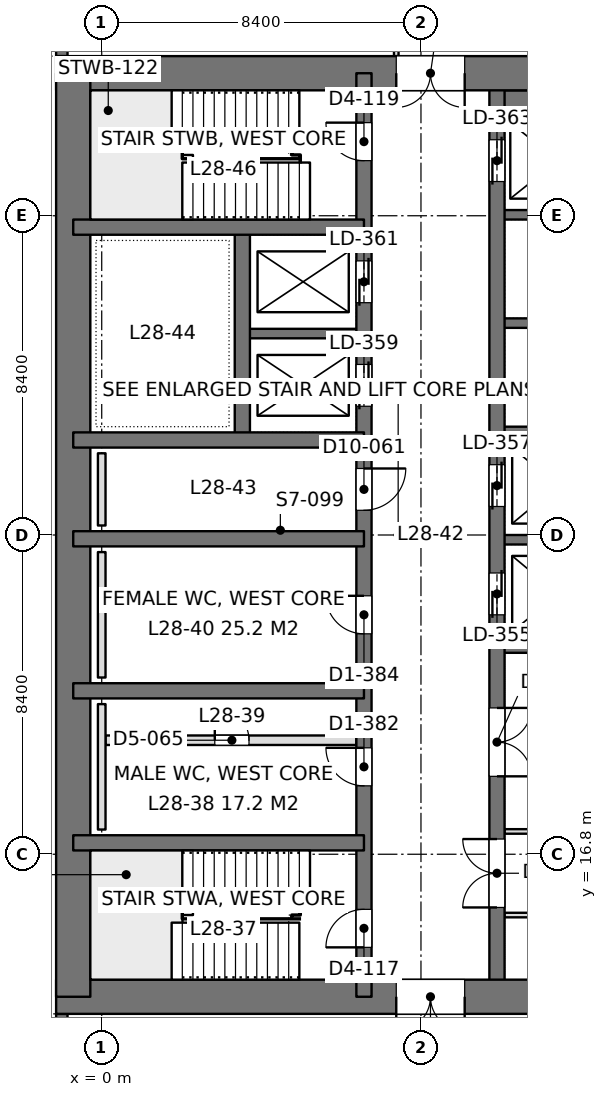
"""IFC4 building model, lengths in metres.
Left out: names, types, materials, properties, quantities, classifications, styles, units other than length and angle.
Written with IfcOpenShell. Run it as: python <this file> out.ifc"""

import sys

from ifc_helpers import new_model, si_unit, direction, frame, frame_2d, origin, place, context, subcontext, project, spatial, rectangle, extrude, element, fill, save


model = new_model("IFC4")
c1 = context("Model", 3, precision=1e-05, world=origin(), true_north=direction((0.0, 1.0)))
c2 = subcontext(c1, "Body", "Model", "MODEL_VIEW")
j1 = project(units=[si_unit("LENGTHUNIT", "METRE"), si_unit("PLANEANGLEUNIT", "RADIAN")], contexts=[c1])
p1 = place(None, origin())
s1 = spatial("IfcSite", under=j1, at=p1, CompositionType="ELEMENT")
p2 = place(p1, origin())
s2 = spatial("IfcBuilding", under=s1, at=p2, CompositionType="ELEMENT")
p3 = place(p2, frame((0.0, 0.0, 126.0)))
s3 = spatial("IfcBuildingStorey", under=s2, at=p3, CompositionType="ELEMENT", Elevation=126.0)
p4 = place(p3, frame((-1.2, 13.05, 0.0), z_axis=(0.0, 0.0, 1.0), x_axis=(1.0, 0.0, 0.0)))
e1 = element("IfcWall", 1, at=p4, inside=s3, PredefinedType="SHEAR", context=c2, shape_type="SweptSolid", body=[
    extrude(rectangle(XDim=18.0, YDim=0.9, at=frame_2d((9.0, 0.0))), origin(), (0.0, 0.0, 1.0), 4.2),
])
p5 = place(p4, frame((8.95, 0.0, 0.0)))
e2 = element("IfcOpeningElement", 2, at=p5, cuts=e1, PredefinedType="OPENING", context=c2, shape_type="SweptSolid", body=[
    extrude(rectangle(XDim=1.8, YDim=2.4, at=frame_2d((0.9, 1.2))), frame((0.0, 0.46, 0.0), z_axis=(0.0, -1.0, 0.0), x_axis=(1.0, 0.0, 0.0)), (0.0, 0.0, 1.0), 0.92),
])
p6 = place(p3, frame((-1.2, 37.35, 0.0), z_axis=(0.0, 0.0, 1.0), x_axis=(1.0, 0.0, 0.0)))
e3 = element("IfcWall", 3, at=p6, inside=s3, PredefinedType="SHEAR", context=c2, shape_type="SweptSolid", body=[
    extrude(rectangle(XDim=18.0, YDim=0.9, at=frame_2d((9.0, 0.0))), origin(), (0.0, 0.0, 1.0), 4.2),
])
p7 = place(p6, frame((8.95, 0.0, 0.0)))
e4 = element("IfcOpeningElement", 4, at=p7, cuts=e3, PredefinedType="OPENING", context=c2, shape_type="SweptSolid", body=[
    extrude(rectangle(XDim=1.8, YDim=2.4, at=frame_2d((0.9, 1.2))), frame((0.0, 0.46, 0.0), z_axis=(0.0, -1.0, 0.0), x_axis=(1.0, 0.0, 0.0)), (0.0, 0.0, 1.0), 0.92),
])
p8 = place(p3, frame((-0.75, 13.05, 0.0), z_axis=(0.0, 0.0, 1.0), x_axis=(0.0, 1.0, 0.0)))
e5 = element("IfcWall", 5, at=p8, inside=s3, PredefinedType="SHEAR", context=c2, shape_type="SweptSolid", body=[
    extrude(rectangle(XDim=24.3, YDim=0.9, at=frame_2d((12.15, 0.0))), origin(), (0.0, 0.0, 1.0), 4.2),
])
p9 = place(p3, frame((6.9, 13.05, 0.0), z_axis=(0.0, 0.0, 1.0), x_axis=(0.0, 1.0, 0.0)))
e6 = element("IfcWall", 6, at=p9, inside=s3, PredefinedType="SHEAR", context=c2, shape_type="SweptSolid", body=[
    extrude(rectangle(XDim=24.3, YDim=0.4, at=frame_2d((12.15, 0.0))), origin(), (0.0, 0.0, 1.0), 4.2),
])
p10 = place(p9, frame((1.3, 0.0, 0.0)))
e7 = element("IfcOpeningElement", 7, at=p10, cuts=e6, PredefinedType="OPENING", context=c2, shape_type="SweptSolid", body=[
    extrude(rectangle(XDim=1.0, YDim=2.2, at=frame_2d((0.5, 1.1))), frame((0.0, 0.21, 0.0), z_axis=(0.0, -1.0, 0.0), x_axis=(1.0, 0.0, 0.0)), (0.0, 0.0, 1.0), 0.42),
])
p11 = place(p9, frame((22.0, 0.0, 0.0)))
e8 = element("IfcOpeningElement", 8, at=p11, cuts=e6, PredefinedType="OPENING", context=c2, shape_type="SweptSolid", body=[
    extrude(rectangle(XDim=1.0, YDim=2.2, at=frame_2d((0.5, 1.1))), frame((0.0, 0.21, 0.0), z_axis=(0.0, -1.0, 0.0), x_axis=(1.0, 0.0, 0.0)), (0.0, 0.0, 1.0), 0.42),
])
p12 = place(p9, frame((5.55, 0.0, 0.0)))
e9 = element("IfcOpeningElement", 9, at=p12, cuts=e6, PredefinedType="OPENING", context=c2, shape_type="SweptSolid", body=[
    extrude(rectangle(XDim=1.0, YDim=2.2, at=frame_2d((0.5, 1.1))), frame((0.0, 0.21, 0.0), z_axis=(0.0, -1.0, 0.0), x_axis=(1.0, 0.0, 0.0)), (0.0, 0.0, 1.0), 0.42),
])
p13 = place(p9, frame((9.55, 0.0, 0.0)))
e10 = element("IfcOpeningElement", 10, at=p13, cuts=e6, PredefinedType="OPENING", context=c2, shape_type="SweptSolid", body=[
    extrude(rectangle(XDim=1.0, YDim=2.2, at=frame_2d((0.5, 1.1))), frame((0.0, 0.21, 0.0), z_axis=(0.0, -1.0, 0.0), x_axis=(1.0, 0.0, 0.0)), (0.0, 0.0, 1.0), 0.42),
])
p14 = place(p9, frame((12.8, 0.0, 0.0)))
e11 = element("IfcOpeningElement", 11, at=p14, cuts=e6, PredefinedType="OPENING", context=c2, shape_type="SweptSolid", body=[
    extrude(rectangle(XDim=1.1, YDim=2.2, at=frame_2d((0.55, 1.1))), frame((0.0, 0.21, 0.0), z_axis=(0.0, -1.0, 0.0), x_axis=(1.0, 0.0, 0.0)), (0.0, 0.0, 1.0), 0.42),
])
p15 = place(p9, frame((15.538, 0.0, 0.0)))
e12 = element("IfcOpeningElement", 12, at=p15, cuts=e6, PredefinedType="OPENING", context=c2, shape_type="SweptSolid", body=[
    extrude(rectangle(XDim=1.1, YDim=2.2, at=frame_2d((0.55, 1.1))), frame((0.0, 0.21, 0.0), z_axis=(0.0, -1.0, 0.0), x_axis=(1.0, 0.0, 0.0)), (0.0, 0.0, 1.0), 0.42),
])
p16 = place(p9, frame((18.262, 0.0, 0.0)))
e13 = element("IfcOpeningElement", 13, at=p16, cuts=e6, PredefinedType="OPENING", context=c2, shape_type="SweptSolid", body=[
    extrude(rectangle(XDim=1.1, YDim=2.2, at=frame_2d((0.55, 1.1))), frame((0.0, 0.21, 0.0), z_axis=(0.0, -1.0, 0.0), x_axis=(1.0, 0.0, 0.0)), (0.0, 0.0, 1.0), 0.42),
])
p17 = place(p3, frame((10.4, 13.05, 0.0), z_axis=(0.0, 0.0, 1.0), x_axis=(0.0, 1.0, 0.0)))
e14 = element("IfcWall", 14, at=p17, inside=s3, PredefinedType="SHEAR", context=c2, shape_type="SweptSolid", body=[
    extrude(rectangle(XDim=24.3, YDim=0.4, at=frame_2d((12.15, 0.0))), origin(), (0.0, 0.0, 1.0), 4.2),
])
p18 = place(p17, frame((10.05, 0.0, 0.0)))
e15 = element("IfcOpeningElement", 15, at=p18, cuts=e14, PredefinedType="OPENING", context=c2, shape_type="SweptSolid", body=[
    extrude(rectangle(XDim=1.1, YDim=2.2, at=frame_2d((0.55, 1.1))), frame((0.0, 0.21, 0.0), z_axis=(0.0, -1.0, 0.0), x_axis=(1.0, 0.0, 0.0)), (0.0, 0.0, 1.0), 0.42),
])
p19 = place(p17, frame((12.9, 0.0, 0.0)))
e16 = element("IfcOpeningElement", 16, at=p19, cuts=e14, PredefinedType="OPENING", context=c2, shape_type="SweptSolid", body=[
    extrude(rectangle(XDim=1.1, YDim=2.2, at=frame_2d((0.55, 1.1))), frame((0.0, 0.21, 0.0), z_axis=(0.0, -1.0, 0.0), x_axis=(1.0, 0.0, 0.0)), (0.0, 0.0, 1.0), 0.42),
])
p20 = place(p17, frame((21.45, 0.0, 0.0)))
e17 = element("IfcOpeningElement", 17, at=p20, cuts=e14, PredefinedType="OPENING", context=c2, shape_type="SweptSolid", body=[
    extrude(rectangle(XDim=1.1, YDim=2.2, at=frame_2d((0.55, 1.1))), frame((0.0, 0.21, 0.0), z_axis=(0.0, -1.0, 0.0), x_axis=(1.0, 0.0, 0.0)), (0.0, 0.0, 1.0), 0.42),
])
p21 = place(p17, frame((2.35, 0.0, 0.0)))
e18 = element("IfcOpeningElement", 18, at=p21, cuts=e14, PredefinedType="OPENING", context=c2, shape_type="SweptSolid", body=[
    extrude(rectangle(XDim=1.8, YDim=2.4, at=frame_2d((0.9, 1.2))), frame((0.0, 0.21, 0.0), z_axis=(0.0, -1.0, 0.0), x_axis=(1.0, 0.0, 0.0)), (0.0, 0.0, 1.0), 0.42),
])
p22 = place(p17, frame((5.8, 0.0, 0.0)))
e19 = element("IfcOpeningElement", 19, at=p22, cuts=e14, PredefinedType="OPENING", context=c2, shape_type="SweptSolid", body=[
    extrude(rectangle(XDim=1.8, YDim=2.4, at=frame_2d((0.9, 1.2))), frame((0.0, 0.21, 0.0), z_axis=(0.0, -1.0, 0.0), x_axis=(1.0, 0.0, 0.0)), (0.0, 0.0, 1.0), 0.42),
])
for number, where, z_axis, x_axis in (
    (20, (-0.75, 17.1, 0.0), (0.0, 0.0, 1.0), (1.0, 0.0, 0.0)),
    (21, (-0.75, 21.1, 0.0), (0.0, 0.0, 1.0), (1.0, 0.0, 0.0)),
    (22, (-0.75, 25.1, 0.0), (0.0, 0.0, 1.0), (1.0, 0.0, 0.0)),
    (23, (-0.75, 27.7, 0.0), (0.0, 0.0, 1.0), (1.0, 0.0, 0.0)),
    (24, (-0.75, 33.3, 0.0), (0.0, 0.0, 1.0), (1.0, 0.0, 0.0)),
):
    element("IfcWall", number, at=place(p3, frame(where, z_axis=z_axis, x_axis=x_axis)), inside=s3, PredefinedType="SHEAR", context=c2, shape_type="SweptSolid", body=[
        extrude(rectangle(XDim=7.65, YDim=0.4, at=frame_2d((3.825, 0.0))), origin(), (0.0, 0.0, 1.0), 4.2),
    ])
p23 = place(p3, frame((3.7, 27.7, 0.0), z_axis=(0.0, 0.0, 1.0), x_axis=(0.0, 1.0, 0.0)))
e25 = element("IfcWall", 25, at=p23, inside=s3, PredefinedType="SHEAR", context=c2, shape_type="SweptSolid", body=[
    extrude(rectangle(XDim=5.6, YDim=0.4, at=frame_2d((2.8, 0.0))), origin(), (0.0, 0.0, 1.0), 4.2),
])
p24 = place(p3, frame((3.7, 30.5, 0.0), z_axis=(0.0, 0.0, 1.0), x_axis=(1.0, 0.0, 0.0)))
e26 = element("IfcWall", 26, at=p24, inside=s3, PredefinedType="SHEAR", context=c2, shape_type="SweptSolid", body=[
    extrude(rectangle(XDim=3.2, YDim=0.25, at=frame_2d((1.6, 0.0))), origin(), (0.0, 0.0, 1.0), 4.2),
])
p25 = place(p3, frame((10.4, 22.225, 0.0), z_axis=(0.0, 0.0, 1.0), x_axis=(1.0, 0.0, 0.0)))
e27 = element("IfcWall", 27, at=p25, inside=s3, PredefinedType="SHEAR", context=c2, shape_type="SweptSolid", body=[
    extrude(rectangle(XDim=5.95, YDim=0.25, at=frame_2d((2.975, 0.0))), origin(), (0.0, 0.0, 1.0), 4.2),
])
for number, where, z_axis, x_axis in (
    (28, (10.4, 25.075, 0.0), (0.0, 0.0, 1.0), (1.0, 0.0, 0.0)),
    (29, (10.4, 27.925, 0.0), (0.0, 0.0, 1.0), (1.0, 0.0, 0.0)),
    (30, (10.4, 30.775, 0.0), (0.0, 0.0, 1.0), (1.0, 0.0, 0.0)),
    (31, (10.4, 33.625, 0.0), (0.0, 0.0, 1.0), (1.0, 0.0, 0.0)),
):
    element("IfcWall", number, at=place(p3, frame(where, z_axis=z_axis, x_axis=x_axis)), inside=s3, PredefinedType="SHEAR", context=c2, shape_type="SweptSolid", body=[
        extrude(rectangle(XDim=3.2, YDim=0.25, at=frame_2d((1.6, 0.0))), origin(), (0.0, 0.0, 1.0), 4.2),
    ])
p26 = place(p3, frame((10.4, 36.625, 0.0), z_axis=(0.0, 0.0, 1.0), x_axis=(1.0, 0.0, 0.0)))
e32 = element("IfcWall", 32, at=p26, inside=s3, PredefinedType="SHEAR", context=c2, shape_type="SweptSolid", body=[
    extrude(rectangle(XDim=3.2, YDim=0.55, at=frame_2d((1.6, 0.0))), origin(), (0.0, 0.0, 1.0), 4.2),
])
p27 = place(p3, frame((-1.05, 8.4, 0.0), z_axis=(0.0, 0.0, 1.0), x_axis=(0.0, 1.0, 0.0)))
e33 = element("IfcWall", 33, at=p27, inside=s3, PredefinedType="SOLIDWALL", context=c2, shape_type="SweptSolid", body=[
    extrude(rectangle(XDim=4.2, YDim=0.3, at=frame_2d((2.1, 0.0))), origin(), (0.0, 0.0, 1.0), 4.05),
])
p28 = place(p27, frame((0.9, 0.0, 0.9)))
e34 = element("IfcOpeningElement", 34, at=p28, cuts=e33, PredefinedType="OPENING", context=c2, shape_type="SweptSolid", body=[
    extrude(rectangle(XDim=2.4, YDim=1.9, at=frame_2d((1.2, 0.95))), frame((0.0, 0.16, 0.0), z_axis=(0.0, -1.0, 0.0), x_axis=(1.0, 0.0, 0.0)), (0.0, 0.0, 1.0), 0.32),
])
p29 = place(p3, frame((-1.05, 37.8, 0.0), z_axis=(0.0, 0.0, 1.0), x_axis=(0.0, 1.0, 0.0)))
e35 = element("IfcWall", 35, at=p29, inside=s3, PredefinedType="SOLIDWALL", context=c2, shape_type="SweptSolid", body=[
    extrude(rectangle(XDim=4.2, YDim=0.3, at=frame_2d((2.1, 0.0))), origin(), (0.0, 0.0, 1.0), 4.05),
])
p30 = place(p29, frame((0.9, 0.0, 0.9)))
e36 = element("IfcOpeningElement", 36, at=p30, cuts=e35, PredefinedType="OPENING", context=c2, shape_type="SweptSolid", body=[
    extrude(rectangle(XDim=2.4, YDim=1.9, at=frame_2d((1.2, 0.95))), frame((0.0, 0.16, 0.0), z_axis=(0.0, -1.0, 0.0), x_axis=(1.0, 0.0, 0.0)), (0.0, 0.0, 1.0), 0.32),
])
p31 = place(p3, frame((10.598, 17.4, 0.0), z_axis=(0.0, 0.0, 1.0), x_axis=(1.0, 0.0, 0.0)))
e37 = element("IfcWall", 37, at=p31, inside=s3, PredefinedType="PARTITIONING", context=c2, shape_type="SweptSolid", body=[
    extrude(rectangle(XDim=5.904, YDim=0.12, at=frame_2d((2.952, 0.0))), origin(), (0.0, 0.0, 1.0), 3.55),
])
p32 = place(p3, frame((10.598, 15.2, 0.0), z_axis=(0.0, 0.0, 1.0), x_axis=(1.0, 0.0, 0.0)))
e38 = element("IfcWall", 38, at=p32, inside=s3, PredefinedType="PARTITIONING", context=c2, shape_type="SweptSolid", body=[
    extrude(rectangle(XDim=6.204, YDim=0.12, at=frame_2d((3.102, 0.0))), origin(), (0.0, 0.0, 1.0), 3.55),
])
p33 = place(p3, frame((7.75, 37.8, 0.0), z_axis=(0.0, 0.0, 1.0), x_axis=(0.0, 1.0, 0.0)))
e39 = element("IfcWall", 39, at=p33, inside=s3, PredefinedType="PARTITIONING", context=c2, shape_type="SweptSolid", body=[
    extrude(rectangle(XDim=2.0, YDim=0.12, at=frame_2d((1.0, 0.0))), origin(), (0.0, 0.0, 1.0), 4.05),
])
p34 = place(p3, frame((0.1, 19.8, 0.0), z_axis=(0.0, 0.0, 1.0), x_axis=(1.0, 0.0, 0.0)))
e40 = element("IfcWall", 40, at=p34, inside=s3, PredefinedType="PARTITIONING", context=c2, shape_type="SweptSolid", body=[
    extrude(rectangle(XDim=6.6, YDim=0.25, at=frame_2d((3.3, 0.0))), origin(), (0.0, 0.0, 1.0), 4.0),
])
p35 = place(p34, frame((2.875, 0.0, 0.0)))
e41 = element("IfcOpeningElement", 41, at=p35, cuts=e40, PredefinedType="OPENING", context=c2, shape_type="SweptSolid", body=[
    extrude(rectangle(XDim=0.9, YDim=2.2, at=frame_2d((0.45, 1.1))), frame((0.0, 0.135, 0.0), z_axis=(0.0, -1.0, 0.0), x_axis=(1.0, 0.0, 0.0)), (0.0, 0.0, 1.0), 0.27),
])
for number, where, z_axis, x_axis in (
    (42, (0.0, 17.45, 0.0), (0.0, 0.0, 1.0), (0.0, 1.0, 0.0)),
    (43, (0.0, 21.45, 0.0), (0.0, 0.0, 1.0), (0.0, 1.0, 0.0)),
):
    element("IfcWall", number, at=place(p3, frame(where, z_axis=z_axis, x_axis=x_axis)), inside=s3, PredefinedType="PLUMBINGWALL", context=c2, shape_type="SweptSolid", body=[
        extrude(rectangle(XDim=3.3, YDim=0.2, at=frame_2d((1.65, 0.0))), origin(), (0.0, 0.0, 1.0), 1.2),
    ])
p36 = place(p3, frame((0.0, 25.45, 0.0), z_axis=(0.0, 0.0, 1.0), x_axis=(0.0, 1.0, 0.0)))
e44 = element("IfcWall", 44, at=p36, inside=s3, PredefinedType="PLUMBINGWALL", context=c2, shape_type="SweptSolid", body=[
    extrude(rectangle(XDim=1.9, YDim=0.2, at=frame_2d((0.95, 0.0))), origin(), (0.0, 0.0, 1.0), 1.2),
])
p37 = place(p5, frame((1.8, 0.0, 0.0), z_axis=(0.0, 0.0, 1.0), x_axis=(-1.0, 0.0, 0.0)))
e45 = element("IfcDoor", 45, at=p37, inside=s3, OperationType="DOUBLE_DOOR_SINGLE_SWING", PredefinedType="DOOR", context=c2, shape_type="SweptSolid", body=[
    extrude(rectangle(XDim=1.8, YDim=2.4, at=frame_2d((0.9, 1.2))), frame((0.0, 0.025, 0.0), z_axis=(0.0, -1.0, 0.0), x_axis=(1.0, 0.0, 0.0)), (0.0, 0.0, 1.0), 0.05),
])
fill(e2, e45)
p38 = place(p7, frame((1.8, 0.0, 0.0), z_axis=(0.0, 0.0, 1.0), x_axis=(-1.0, 0.0, 0.0)))
e46 = element("IfcDoor", 46, at=p38, inside=s3, OperationType="DOUBLE_DOOR_SINGLE_SWING", PredefinedType="DOOR", context=c2, shape_type="SweptSolid", body=[
    extrude(rectangle(XDim=1.8, YDim=2.4, at=frame_2d((0.9, 1.2))), frame((0.0, 0.025, 0.0), z_axis=(0.0, -1.0, 0.0), x_axis=(1.0, 0.0, 0.0)), (0.0, 0.0, 1.0), 0.05),
])
fill(e4, e46)
p39 = place(p10, origin())
e47 = element("IfcDoor", 47, at=p39, inside=s3, OperationType="SINGLE_SWING_LEFT", PredefinedType="DOOR", context=c2, shape_type="SweptSolid", body=[
    extrude(rectangle(XDim=1.0, YDim=2.2, at=frame_2d((0.5, 1.1))), frame((0.0, 0.025, 0.0), z_axis=(0.0, -1.0, 0.0), x_axis=(1.0, 0.0, 0.0)), (0.0, 0.0, 1.0), 0.05),
])
fill(e7, e47)
p40 = place(p11, origin())
e48 = element("IfcDoor", 48, at=p40, inside=s3, OperationType="SINGLE_SWING_RIGHT", PredefinedType="DOOR", context=c2, shape_type="SweptSolid", body=[
    extrude(rectangle(XDim=1.0, YDim=2.2, at=frame_2d((0.5, 1.1))), frame((0.0, 0.025, 0.0), z_axis=(0.0, -1.0, 0.0), x_axis=(1.0, 0.0, 0.0)), (0.0, 0.0, 1.0), 0.05),
])
fill(e8, e48)
p41 = place(p12, origin())
e49 = element("IfcDoor", 49, at=p41, inside=s3, OperationType="SINGLE_SWING_RIGHT", PredefinedType="DOOR", context=c2, shape_type="SweptSolid", body=[
    extrude(rectangle(XDim=1.0, YDim=2.2, at=frame_2d((0.5, 1.1))), frame((0.0, 0.025, 0.0), z_axis=(0.0, -1.0, 0.0), x_axis=(1.0, 0.0, 0.0)), (0.0, 0.0, 1.0), 0.05),
])
fill(e9, e49)
p42 = place(p13, origin())
e50 = element("IfcDoor", 50, at=p42, inside=s3, OperationType="SINGLE_SWING_RIGHT", PredefinedType="DOOR", context=c2, shape_type="SweptSolid", body=[
    extrude(rectangle(XDim=1.0, YDim=2.2, at=frame_2d((0.5, 1.1))), frame((0.0, 0.025, 0.0), z_axis=(0.0, -1.0, 0.0), x_axis=(1.0, 0.0, 0.0)), (0.0, 0.0, 1.0), 0.05),
])
fill(e10, e50)
p43 = place(p14, frame((1.1, 0.0, 0.0), z_axis=(0.0, 0.0, 1.0), x_axis=(-1.0, 0.0, 0.0)))
e51 = element("IfcDoor", 51, at=p43, inside=s3, OperationType="SINGLE_SWING_LEFT", PredefinedType="DOOR", context=c2, shape_type="SweptSolid", body=[
    extrude(rectangle(XDim=1.1, YDim=2.2, at=frame_2d((0.55, 1.1))), frame((0.0, 0.025, 0.0), z_axis=(0.0, -1.0, 0.0), x_axis=(1.0, 0.0, 0.0)), (0.0, 0.0, 1.0), 0.05),
])
fill(e11, e51)
p44 = place(p18, origin())
e52 = element("IfcDoor", 52, at=p44, inside=s3, OperationType="DOUBLE_DOOR_SLIDING", PredefinedType="DOOR", context=c2, shape_type="SweptSolid", body=[
    extrude(rectangle(XDim=1.1, YDim=2.2, at=frame_2d((0.55, 1.1))), frame((0.0, 0.025, 0.0), z_axis=(0.0, -1.0, 0.0), x_axis=(1.0, 0.0, 0.0)), (0.0, 0.0, 1.0), 0.05),
])
fill(e15, e52)
p45 = place(p19, origin())
e53 = element("IfcDoor", 53, at=p45, inside=s3, OperationType="DOUBLE_DOOR_SLIDING", PredefinedType="DOOR", context=c2, shape_type="SweptSolid", body=[
    extrude(rectangle(XDim=1.1, YDim=2.2, at=frame_2d((0.55, 1.1))), frame((0.0, 0.025, 0.0), z_axis=(0.0, -1.0, 0.0), x_axis=(1.0, 0.0, 0.0)), (0.0, 0.0, 1.0), 0.05),
])
fill(e16, e53)
p46 = place(p20, origin())
e54 = element("IfcDoor", 54, at=p46, inside=s3, OperationType="DOUBLE_DOOR_SLIDING", PredefinedType="DOOR", context=c2, shape_type="SweptSolid", body=[
    extrude(rectangle(XDim=1.1, YDim=2.2, at=frame_2d((0.55, 1.1))), frame((0.0, 0.025, 0.0), z_axis=(0.0, -1.0, 0.0), x_axis=(1.0, 0.0, 0.0)), (0.0, 0.0, 1.0), 0.05),
])
fill(e17, e54)
p47 = place(p15, origin())
e55 = element("IfcDoor", 55, at=p47, inside=s3, OperationType="DOUBLE_DOOR_SLIDING", PredefinedType="DOOR", context=c2, shape_type="SweptSolid", body=[
    extrude(rectangle(XDim=1.1, YDim=2.2, at=frame_2d((0.55, 1.1))), frame((0.0, 0.025, 0.0), z_axis=(0.0, -1.0, 0.0), x_axis=(1.0, 0.0, 0.0)), (0.0, 0.0, 1.0), 0.05),
])
fill(e12, e55)
p48 = place(p16, origin())
e56 = element("IfcDoor", 56, at=p48, inside=s3, OperationType="DOUBLE_DOOR_SLIDING", PredefinedType="DOOR", context=c2, shape_type="SweptSolid", body=[
    extrude(rectangle(XDim=1.1, YDim=2.2, at=frame_2d((0.55, 1.1))), frame((0.0, 0.025, 0.0), z_axis=(0.0, -1.0, 0.0), x_axis=(1.0, 0.0, 0.0)), (0.0, 0.0, 1.0), 0.05),
])
fill(e13, e56)
p49 = place(p21, origin())
e57 = element("IfcDoor", 57, at=p49, inside=s3, OperationType="DOUBLE_DOOR_SINGLE_SWING", PredefinedType="DOOR", context=c2, shape_type="SweptSolid", body=[
    extrude(rectangle(XDim=1.8, YDim=2.4, at=frame_2d((0.9, 1.2))), frame((0.0, 0.025, 0.0), z_axis=(0.0, -1.0, 0.0), x_axis=(1.0, 0.0, 0.0)), (0.0, 0.0, 1.0), 0.05),
])
fill(e18, e57)
p50 = place(p22, frame((1.8, 0.0, 0.0), z_axis=(0.0, 0.0, 1.0), x_axis=(-1.0, 0.0, 0.0)))
e58 = element("IfcDoor", 58, at=p50, inside=s3, OperationType="DOUBLE_DOOR_SINGLE_SWING", PredefinedType="DOOR", context=c2, shape_type="SweptSolid", body=[
    extrude(rectangle(XDim=1.8, YDim=2.4, at=frame_2d((0.9, 1.2))), frame((0.0, 0.025, 0.0), z_axis=(0.0, -1.0, 0.0), x_axis=(1.0, 0.0, 0.0)), (0.0, 0.0, 1.0), 0.05),
])
fill(e19, e58)
p51 = place(p35, origin())
e59 = element("IfcDoor", 59, at=p51, inside=s3, OperationType="SINGLE_SWING_LEFT", PredefinedType="DOOR", context=c2, shape_type="SweptSolid", body=[
    extrude(rectangle(XDim=0.9, YDim=2.2, at=frame_2d((0.45, 1.1))), frame((0.0, 0.025, 0.0), z_axis=(0.0, -1.0, 0.0), x_axis=(1.0, 0.0, 0.0)), (0.0, 0.0, 1.0), 0.05),
])
fill(e41, e59)
save(model, sys.argv[1])
